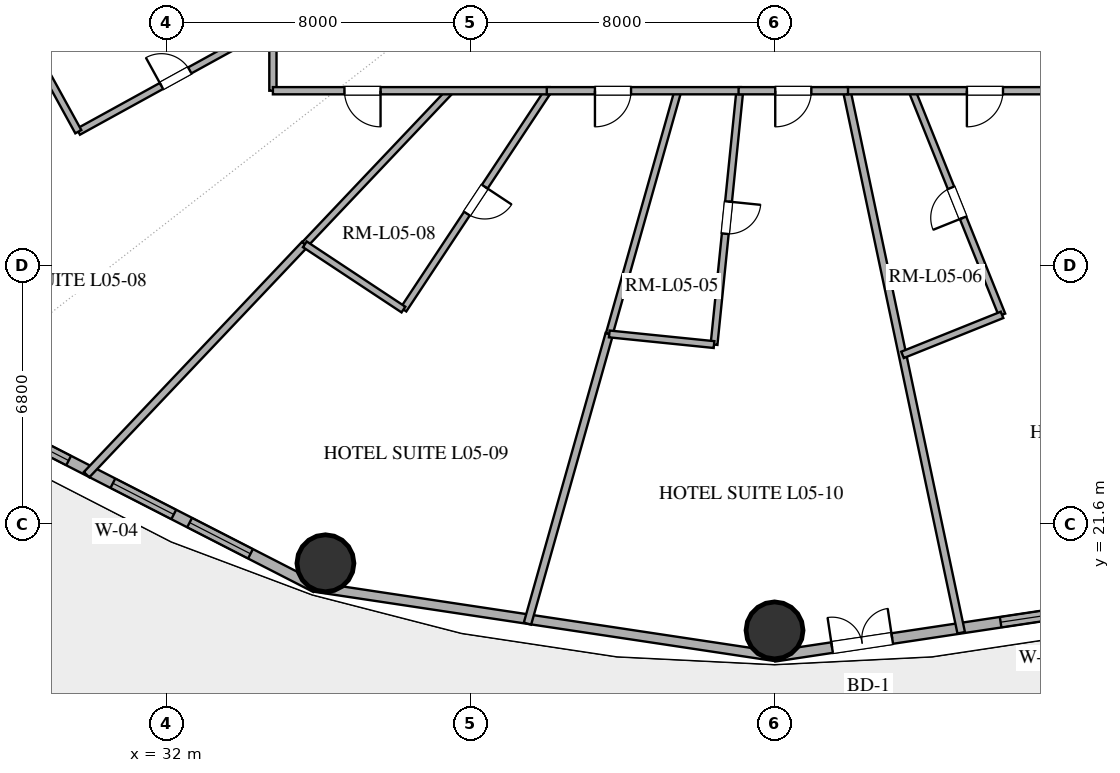
"""IFC4 building model, lengths in metres.
Left out: names, types, materials, properties, quantities, classifications, styles, units other than length and angle.
Written with IfcOpenShell. Run it as: python <this file> out.ifc"""

import sys

from ifc_helpers import new_model, si_unit, direction, frame, frame_2d, origin, origin_2d, place, context, subcontext, project, spatial, rectangle, hollow_circle, extrude, element, fill, save


model = new_model("IFC4")
c1 = context("Model", 3, precision=1e-05, world=origin(), true_north=direction((0.0, 1.0)))
c2 = subcontext(c1, "Body", "Model", "MODEL_VIEW")
j1 = project(units=[si_unit("LENGTHUNIT", "METRE"), si_unit("PLANEANGLEUNIT", "RADIAN")], contexts=[c1])
p1 = place(None, origin())
s1 = spatial("IfcSite", under=j1, at=p1, CompositionType="ELEMENT")
p2 = place(p1, origin())
s2 = spatial("IfcBuilding", under=s1, at=p2, CompositionType="ELEMENT")
p3 = place(p2, frame((0.0, 0.0, 28.2)))
s3 = spatial("IfcBuildingStorey", under=s2, at=p3, CompositionType="ELEMENT", Elevation=28.2)
for number, where, z_axis, x_axis in (
    (1, (36.182, 20.566, 0.0), (0.0, 0.0, 1.0), (1.0, 0.0, 0.0)),
    (2, (48.0, 18.8, 0.0), (0.0, 0.0, 1.0), (1.0, 0.0, 0.0)),
):
    element("IfcColumn", number, at=place(p3, frame(where, z_axis=z_axis, x_axis=x_axis)), inside=s3, PredefinedType="COLUMN", context=c2, shape_type="SweptSolid", body=[
        extrude(hollow_circle(Radius=0.75, WallThickness=0.04, at=origin_2d()), origin(), (0.0, 0.0, 1.0), 3.38),
    ])
p4 = place(p3, frame((25.826, 25.114, 0.0), z_axis=(0.0, 0.0, 1.0), x_axis=(0.889853976658, -0.456245438581, 0.0)))
e3 = element("IfcWall", 3, at=p4, inside=s3, PredefinedType="SOLIDWALL", context=c2, shape_type="SweptSolid", body=[
    extrude(rectangle(XDim=11.346, YDim=0.28, at=frame_2d((5.673, 0.0))), origin(), (0.0, 0.0, 1.0), 3.38),
])
p5 = place(p4, frame((1.945, 0.0, 0.85)))
e4 = element("IfcOpeningElement", 4, at=p5, cuts=e3, PredefinedType="OPENING", context=c2, shape_type="SweptSolid", body=[
    extrude(rectangle(XDim=2.1, YDim=2.2, at=frame_2d((1.05, 1.1))), frame((0.0, 0.15, 0.0), z_axis=(0.0, -1.0, 0.0), x_axis=(1.0, 0.0, 0.0)), (0.0, 0.0, 1.0), 0.3),
])
p6 = place(p4, frame((5.353, 0.0, 0.85)))
e5 = element("IfcOpeningElement", 5, at=p6, cuts=e3, PredefinedType="OPENING", context=c2, shape_type="SweptSolid", body=[
    extrude(rectangle(XDim=1.8, YDim=2.2, at=frame_2d((0.9, 1.1))), frame((0.0, 0.15, 0.0), z_axis=(0.0, -1.0, 0.0), x_axis=(1.0, 0.0, 0.0)), (0.0, 0.0, 1.0), 0.3),
])
p7 = place(p4, frame((7.622, 0.0, 0.85)))
e6 = element("IfcOpeningElement", 6, at=p7, cuts=e3, PredefinedType="OPENING", context=c2, shape_type="SweptSolid", body=[
    extrude(rectangle(XDim=1.8, YDim=2.2, at=frame_2d((0.9, 1.1))), frame((0.0, 0.15, 0.0), z_axis=(0.0, -1.0, 0.0), x_axis=(1.0, 0.0, 0.0)), (0.0, 0.0, 1.0), 0.3),
])
p8 = place(p3, frame((35.922, 19.938, 0.0), z_axis=(0.0, 0.0, 1.0), x_axis=(0.988864835849, -0.148816452121, 0.0)))
e7 = element("IfcWall", 7, at=p8, inside=s3, PredefinedType="SOLIDWALL", context=c2, shape_type="SweptSolid", body=[
    extrude(rectangle(XDim=12.214, YDim=0.25, at=frame_2d((6.107, 0.0))), origin(), (0.0, 0.0, 1.0), 3.38),
])
p9 = place(p3, frame((48.0, 18.12, 0.0), z_axis=(0.0, 0.0, 1.0), x_axis=(0.988864835849, 0.148816452121, 0.0)))
e8 = element("IfcWall", 8, at=p9, inside=s3, PredefinedType="SOLIDWALL", context=c2, shape_type="SweptSolid", body=[
    extrude(rectangle(XDim=12.214, YDim=0.28, at=frame_2d((6.107, 0.0))), origin(), (0.0, 0.0, 1.0), 3.38),
])
p10 = place(p9, frame((1.531, 0.0, 0.0)))
e9 = element("IfcOpeningElement", 9, at=p10, cuts=e8, PredefinedType="OPENING", context=c2, shape_type="SweptSolid", body=[
    extrude(rectangle(XDim=1.6, YDim=2.25, at=frame_2d((0.8, 1.125))), frame((0.0, 0.15, 0.0), z_axis=(0.0, -1.0, 0.0), x_axis=(1.0, 0.0, 0.0)), (0.0, 0.0, 1.0), 0.3),
])
p11 = place(p9, frame((6.016, 0.0, 0.85)))
e10 = element("IfcOpeningElement", 10, at=p11, cuts=e8, PredefinedType="OPENING", context=c2, shape_type="SweptSolid", body=[
    extrude(rectangle(XDim=1.5, YDim=2.0, at=frame_2d((0.75, 1.0))), frame((0.0, 0.15, 0.0), z_axis=(0.0, -1.0, 0.0), x_axis=(1.0, 0.0, 0.0)), (0.0, 0.0, 1.0), 0.3),
])
p12 = place(p9, frame((8.333, 0.0, 0.85)))
e11 = element("IfcOpeningElement", 11, at=p12, cuts=e8, PredefinedType="OPENING", context=c2, shape_type="SweptSolid", body=[
    extrude(rectangle(XDim=1.5, YDim=2.0, at=frame_2d((0.75, 1.0))), frame((0.0, 0.15, 0.0), z_axis=(0.0, -1.0, 0.0), x_axis=(1.0, 0.0, 0.0)), (0.0, 0.0, 1.0), 0.3),
])
p13 = place(p3, frame((34.8, 37.494, 0.0), z_axis=(0.0, 0.0, 1.0), x_axis=(-0.946390715793, -0.32302416792, 0.0)))
e12 = element("IfcWall", 12, at=p13, inside=s3, PredefinedType="PARTITIONING", context=c2, shape_type="SweptSolid", body=[
    extrude(rectangle(XDim=15.952, YDim=0.2, at=frame_2d((7.976, 0.0))), origin(), (0.0, 0.0, 1.0), 2.74),
])
p14 = place(p3, frame((29.897, 22.898, 0.0), z_axis=(0.0, 0.0, 1.0), x_axis=(0.687860615602, 0.725842802198, 0.0)))
e13 = element("IfcWall", 13, at=p14, inside=s3, PredefinedType="PARTITIONING", context=c2, shape_type="SweptSolid", body=[
    extrude(rectangle(XDim=8.35, YDim=0.2, at=frame_2d((4.175, 0.0))), origin(), (0.0, 0.0, 1.0), 2.74),
])
p15 = place(p3, frame((41.499, 18.978, 0.0), z_axis=(0.0, 0.0, 1.0), x_axis=(0.271768364569, 0.962362694632, 0.0)))
e14 = element("IfcWall", 14, at=p15, inside=s3, PredefinedType="PARTITIONING", context=c2, shape_type="SweptSolid", body=[
    extrude(rectangle(XDim=7.921, YDim=0.2, at=frame_2d((3.96, 0.0))), origin(), (0.0, 0.0, 1.0), 2.74),
])
p16 = place(p3, frame((49.9, 33.0, 0.0), z_axis=(0.0, 0.0, 1.0), x_axis=(0.206598790959, -0.97842574556, 0.0)))
e15 = element("IfcWall", 15, at=p16, inside=s3, PredefinedType="PARTITIONING", context=c2, shape_type="SweptSolid", body=[
    extrude(rectangle(XDim=14.576, YDim=0.2, at=frame_2d((7.288, 0.0))), origin(), (0.0, 0.0, 1.0), 2.74),
])
p17 = place(p3, frame((42.045, 33.0, 0.0), z_axis=(0.0, 0.0, 1.0), x_axis=(-0.551832909025, -0.833954699319, 0.0)))
e16 = element("IfcWall", 16, at=p17, inside=s3, PredefinedType="PLUMBINGWALL", context=c2, shape_type="SweptSolid", body=[
    extrude(rectangle(XDim=6.905, YDim=0.18, at=frame_2d((3.452, 0.0))), origin(), (0.0, 0.0, 1.0), 2.74),
])
p18 = place(p17, frame((3.027, 0.0, 0.0)))
e17 = element("IfcOpeningElement", 17, at=p18, cuts=e16, PredefinedType="OPENING", context=c2, shape_type="SweptSolid", body=[
    extrude(rectangle(XDim=0.85, YDim=2.1, at=frame_2d((0.425, 1.05))), frame((0.0, 0.1, 0.0), z_axis=(0.0, -1.0, 0.0), x_axis=(1.0, 0.0, 0.0)), (0.0, 0.0, 1.0), 0.2),
])
p19 = place(p3, frame((47.086, 33.0, 0.0), z_axis=(0.0, 0.0, 1.0), x_axis=(-0.101019373019, -0.994884458756, 0.0)))
e18 = element("IfcWall", 18, at=p19, inside=s3, PredefinedType="PLUMBINGWALL", context=c2, shape_type="SweptSolid", body=[
    extrude(rectangle(XDim=6.714, YDim=0.18, at=frame_2d((3.357, 0.0))), origin(), (0.0, 0.0, 1.0), 2.74),
])
p20 = place(p19, frame((2.932, 0.0, 0.0)))
e19 = element("IfcOpeningElement", 19, at=p20, cuts=e18, PredefinedType="OPENING", context=c2, shape_type="SweptSolid", body=[
    extrude(rectangle(XDim=0.85, YDim=2.1, at=frame_2d((0.425, 1.05))), frame((0.0, 0.1, 0.0), z_axis=(0.0, -1.0, 0.0), x_axis=(1.0, 0.0, 0.0)), (0.0, 0.0, 1.0), 0.2),
])
p21 = place(p3, frame((43.651, 26.601, 0.0), z_axis=(0.0, 0.0, 1.0), x_axis=(0.271761873698, 0.962364527611, 0.0)))
e20 = element("IfcWall", 20, at=p21, inside=s3, PredefinedType="PLUMBINGWALL", context=c2, shape_type="SweptSolid", body=[
    extrude(rectangle(XDim=6.65, YDim=0.18, at=frame_2d((3.325, 0.0))), origin(), (0.0, 0.0, 1.0), 2.74),
])
p22 = place(p3, frame((34.8, 33.0, 0.0), z_axis=(0.0, 0.0, 1.0), x_axis=(0.0, 1.0, 0.0)))
e21 = element("IfcWall", 21, at=p22, inside=s3, PredefinedType="PARTITIONING", context=c2, shape_type="SweptSolid", body=[
    extrude(rectangle(XDim=18.0, YDim=0.19, at=frame_2d((9.0, 0.0))), origin(), (0.0, 0.0, 1.0), 2.74),
])
p23 = place(p22, frame((7.274, 0.0, 0.0)))
e22 = element("IfcOpeningElement", 22, at=p23, cuts=e21, PredefinedType="OPENING", context=c2, shape_type="SweptSolid", body=[
    extrude(rectangle(XDim=1.0, YDim=2.2, at=frame_2d((0.5, 1.1))), frame((0.0, 0.105, 0.0), z_axis=(0.0, -1.0, 0.0), x_axis=(1.0, 0.0, 0.0)), (0.0, 0.0, 1.0), 0.21),
])
p24 = place(p22, frame((12.854, 0.0, 0.0)))
e23 = element("IfcOpeningElement", 23, at=p24, cuts=e21, PredefinedType="OPENING", context=c2, shape_type="SweptSolid", body=[
    extrude(rectangle(XDim=0.95, YDim=2.15, at=frame_2d((0.475, 1.075))), frame((0.0, 0.105, 0.0), z_axis=(0.0, -1.0, 0.0), x_axis=(1.0, 0.0, 0.0)), (0.0, 0.0, 1.0), 0.21),
])
p25 = place(p3, frame((53.987, 27.102, 0.0), z_axis=(0.0, 0.0, 1.0), x_axis=(-0.37285379951, 0.927890103509, 0.0)))
e24 = element("IfcWall", 24, at=p25, inside=s3, PredefinedType="PLUMBINGWALL", context=c2, shape_type="SweptSolid", body=[
    extrude(rectangle(XDim=6.356, YDim=0.18, at=frame_2d((3.178, 0.0))), origin(), (0.0, 0.0, 1.0), 2.74),
])
p26 = place(p25, frame((2.753, 0.0, 0.0)))
e25 = element("IfcOpeningElement", 25, at=p26, cuts=e24, PredefinedType="OPENING", context=c2, shape_type="SweptSolid", body=[
    extrude(rectangle(XDim=0.85, YDim=2.1, at=frame_2d((0.425, 1.05))), frame((0.0, 0.1, 0.0), z_axis=(0.0, -1.0, 0.0), x_axis=(1.0, 0.0, 0.0)), (0.0, 0.0, 1.0), 0.2),
])
p27 = place(p3, frame((29.679, 31.922, 0.0), z_axis=(0.0, 0.0, 1.0), x_axis=(0.876185038284, 0.481974873503, 0.0)))
e26 = element("IfcWall", 26, at=p27, inside=s3, PredefinedType="PLUMBINGWALL", context=c2, shape_type="SweptSolid", body=[
    extrude(rectangle(XDim=5.844, YDim=0.18, at=frame_2d((2.922, 0.0))), origin(), (0.0, 0.0, 1.0), 2.74),
])
p28 = place(p27, frame((2.497, 0.0, 0.0)))
e27 = element("IfcOpeningElement", 27, at=p28, cuts=e26, PredefinedType="OPENING", context=c2, shape_type="SweptSolid", body=[
    extrude(rectangle(XDim=0.85, YDim=2.1, at=frame_2d((0.425, 1.05))), frame((0.0, 0.1, 0.0), z_axis=(0.0, -1.0, 0.0), x_axis=(1.0, 0.0, 0.0)), (0.0, 0.0, 1.0), 0.2),
])
p29 = place(p3, frame((35.64, 28.958, 0.0), z_axis=(0.0, 0.0, 1.0), x_axis=(0.687867465085, 0.725836311077, 0.0)))
e28 = element("IfcWall", 28, at=p29, inside=s3, PredefinedType="PLUMBINGWALL", context=c2, shape_type="SweptSolid", body=[
    extrude(rectangle(XDim=5.568, YDim=0.18, at=frame_2d((2.784, 0.0))), origin(), (0.0, 0.0, 1.0), 2.74),
])
p30 = place(p3, frame((42.083, 33.0, 0.0), z_axis=(0.0, 0.0, 1.0), x_axis=(-1.0, 0.0, 0.0)))
e29 = element("IfcWall", 29, at=p30, inside=s3, PredefinedType="PARTITIONING", context=c2, shape_type="SweptSolid", body=[
    extrude(rectangle(XDim=7.283, YDim=0.19, at=frame_2d((3.642, 0.0))), origin(), (0.0, 0.0, 1.0), 2.74),
])
p31 = place(p30, frame((4.451, 0.0, 0.0)))
e30 = element("IfcOpeningElement", 30, at=p31, cuts=e29, PredefinedType="OPENING", context=c2, shape_type="SweptSolid", body=[
    extrude(rectangle(XDim=0.95, YDim=2.15, at=frame_2d((0.475, 1.075))), frame((0.0, 0.105, 0.0), z_axis=(0.0, -1.0, 0.0), x_axis=(1.0, 0.0, 0.0)), (0.0, 0.0, 1.0), 0.21),
])
p32 = place(p3, frame((61.2, 33.0, 0.0), z_axis=(0.0, 0.0, 1.0), x_axis=(-1.0, 0.0, 0.0)))
e31 = element("IfcWall", 31, at=p32, inside=s3, PredefinedType="PARTITIONING", context=c2, shape_type="SweptSolid", body=[
    extrude(rectangle(XDim=11.3, YDim=0.19, at=frame_2d((5.65, 0.0))), origin(), (0.0, 0.0, 1.0), 2.74),
])
p33 = place(p32, frame((7.188, 0.0, 0.0)))
e32 = element("IfcOpeningElement", 32, at=p33, cuts=e31, PredefinedType="OPENING", context=c2, shape_type="SweptSolid", body=[
    extrude(rectangle(XDim=0.95, YDim=2.15, at=frame_2d((0.475, 1.075))), frame((0.0, 0.105, 0.0), z_axis=(0.0, -1.0, 0.0), x_axis=(1.0, 0.0, 0.0)), (0.0, 0.0, 1.0), 0.21),
])
p34 = place(p3, frame((27.908, 35.142, 0.0), z_axis=(0.0, 0.0, 1.0), x_axis=(0.481967195945, -0.876189261537, 0.0)))
e33 = element("IfcWall", 33, at=p34, inside=s3, PredefinedType="PLUMBINGWALL", context=c2, shape_type="SweptSolid", body=[
    extrude(rectangle(XDim=3.676, YDim=0.18, at=frame_2d((1.838, 0.0))), origin(), (0.0, 0.0, 1.0), 2.74),
])
p35 = place(p3, frame((47.118, 33.0, 0.0), z_axis=(0.0, 0.0, 1.0), x_axis=(-1.0, 0.0, 0.0)))
e34 = element("IfcWall", 34, at=p35, inside=s3, PredefinedType="PARTITIONING", context=c2, shape_type="SweptSolid", body=[
    extrude(rectangle(XDim=5.112, YDim=0.19, at=frame_2d((2.556, 0.0))), origin(), (0.0, 0.0, 1.0), 2.74),
])
p36 = place(p35, frame((2.894, 0.0, 0.0)))
e35 = element("IfcOpeningElement", 35, at=p36, cuts=e34, PredefinedType="OPENING", context=c2, shape_type="SweptSolid", body=[
    extrude(rectangle(XDim=0.95, YDim=2.15, at=frame_2d((0.475, 1.075))), frame((0.0, 0.105, 0.0), z_axis=(0.0, -1.0, 0.0), x_axis=(1.0, 0.0, 0.0)), (0.0, 0.0, 1.0), 0.21),
])
p37 = place(p3, frame((38.235, 27.242, 0.0), z_axis=(0.0, 0.0, 1.0), x_axis=(-0.833965136837, 0.551817135055, 0.0)))
e36 = element("IfcWall", 36, at=p37, inside=s3, PredefinedType="PLUMBINGWALL", context=c2, shape_type="SweptSolid", body=[
    extrude(rectangle(XDim=3.111, YDim=0.18, at=frame_2d((1.555, 0.0))), origin(), (0.0, 0.0, 1.0), 2.74),
])
p38 = place(p3, frame((49.933, 33.0, 0.0), z_axis=(0.0, 0.0, 1.0), x_axis=(-1.0, 0.0, 0.0)))
e37 = element("IfcWall", 37, at=p38, inside=s3, PredefinedType="PARTITIONING", context=c2, shape_type="SweptSolid", body=[
    extrude(rectangle(XDim=2.879, YDim=0.19, at=frame_2d((1.44, 0.0))), origin(), (0.0, 0.0, 1.0), 2.74),
])
p39 = place(p38, frame((0.965, 0.0, 0.0)))
e38 = element("IfcOpeningElement", 38, at=p39, cuts=e37, PredefinedType="OPENING", context=c2, shape_type="SweptSolid", body=[
    extrude(rectangle(XDim=0.95, YDim=2.15, at=frame_2d((0.475, 1.075))), frame((0.0, 0.105, 0.0), z_axis=(0.0, -1.0, 0.0), x_axis=(1.0, 0.0, 0.0)), (0.0, 0.0, 1.0), 0.21),
])
p40 = place(p3, frame((51.368, 26.05, 0.0), z_axis=(0.0, 0.0, 1.0), x_axis=(0.927890861741, 0.372851912558, 0.0)))
e39 = element("IfcWall", 39, at=p40, inside=s3, PredefinedType="PLUMBINGWALL", context=c2, shape_type="SweptSolid", body=[
    extrude(rectangle(XDim=2.822, YDim=0.18, at=frame_2d((1.411, 0.0))), origin(), (0.0, 0.0, 1.0), 2.74),
])
p41 = place(p3, frame((46.407, 26.321, 0.0), z_axis=(0.0, 0.0, 1.0), x_axis=(-0.994878004338, 0.101082918857, 0.0)))
e40 = element("IfcWall", 40, at=p41, inside=s3, PredefinedType="PLUMBINGWALL", context=c2, shape_type="SweptSolid", body=[
    extrude(rectangle(XDim=2.77, YDim=0.18, at=frame_2d((1.385, 0.0))), origin(), (0.0, 0.0, 1.0), 2.74),
])
p42 = place(p5, origin())
e41 = element("IfcWindow", 41, at=p42, inside=s3, PartitioningType="SINGLE_PANEL", PredefinedType="WINDOW", context=c2, shape_type="SweptSolid", body=[
    extrude(rectangle(XDim=2.1, YDim=2.2, at=frame_2d((1.05, 1.1))), frame((0.0, 0.03, 0.0), z_axis=(0.0, -1.0, 0.0), x_axis=(1.0, 0.0, 0.0)), (0.0, 0.0, 1.0), 0.06),
])
fill(e4, e41)
p43 = place(p6, origin())
e42 = element("IfcWindow", 42, at=p43, inside=s3, PartitioningType="SINGLE_PANEL", PredefinedType="WINDOW", context=c2, shape_type="SweptSolid", body=[
    extrude(rectangle(XDim=1.8, YDim=2.2, at=frame_2d((0.9, 1.1))), frame((0.0, 0.03, 0.0), z_axis=(0.0, -1.0, 0.0), x_axis=(1.0, 0.0, 0.0)), (0.0, 0.0, 1.0), 0.06),
])
fill(e5, e42)
p44 = place(p7, origin())
e43 = element("IfcWindow", 43, at=p44, inside=s3, PartitioningType="SINGLE_PANEL", PredefinedType="WINDOW", context=c2, shape_type="SweptSolid", body=[
    extrude(rectangle(XDim=1.8, YDim=2.2, at=frame_2d((0.9, 1.1))), frame((0.0, 0.03, 0.0), z_axis=(0.0, -1.0, 0.0), x_axis=(1.0, 0.0, 0.0)), (0.0, 0.0, 1.0), 0.06),
])
fill(e6, e43)
p45 = place(p10, origin())
e44 = element("IfcDoor", 44, at=p45, inside=s3, OperationType="DOUBLE_DOOR_SINGLE_SWING", PredefinedType="DOOR", context=c2, shape_type="SweptSolid", body=[
    extrude(rectangle(XDim=1.6, YDim=2.25, at=frame_2d((0.8, 1.125))), frame((0.0, 0.025, 0.0), z_axis=(0.0, -1.0, 0.0), x_axis=(1.0, 0.0, 0.0)), (0.0, 0.0, 1.0), 0.05),
])
fill(e9, e44)
p46 = place(p11, origin())
e45 = element("IfcWindow", 45, at=p46, inside=s3, PartitioningType="SINGLE_PANEL", PredefinedType="WINDOW", context=c2, shape_type="SweptSolid", body=[
    extrude(rectangle(XDim=1.5, YDim=2.0, at=frame_2d((0.75, 1.0))), frame((0.0, 0.03, 0.0), z_axis=(0.0, -1.0, 0.0), x_axis=(1.0, 0.0, 0.0)), (0.0, 0.0, 1.0), 0.06),
])
fill(e10, e45)
p47 = place(p18, origin())
e46 = element("IfcDoor", 46, at=p47, inside=s3, OperationType="SINGLE_SWING_LEFT", PredefinedType="DOOR", context=c2, shape_type="SweptSolid", body=[
    extrude(rectangle(XDim=0.85, YDim=2.1, at=frame_2d((0.425, 1.05))), frame((0.0, 0.025, 0.0), z_axis=(0.0, -1.0, 0.0), x_axis=(1.0, 0.0, 0.0)), (0.0, 0.0, 1.0), 0.05),
])
fill(e17, e46)
p48 = place(p20, origin())
e47 = element("IfcDoor", 47, at=p48, inside=s3, OperationType="SINGLE_SWING_LEFT", PredefinedType="DOOR", context=c2, shape_type="SweptSolid", body=[
    extrude(rectangle(XDim=0.85, YDim=2.1, at=frame_2d((0.425, 1.05))), frame((0.0, 0.025, 0.0), z_axis=(0.0, -1.0, 0.0), x_axis=(1.0, 0.0, 0.0)), (0.0, 0.0, 1.0), 0.05),
])
fill(e19, e47)
p49 = place(p26, origin())
e48 = element("IfcDoor", 48, at=p49, inside=s3, OperationType="SINGLE_SWING_LEFT", PredefinedType="DOOR", context=c2, shape_type="SweptSolid", body=[
    extrude(rectangle(XDim=0.85, YDim=2.1, at=frame_2d((0.425, 1.05))), frame((0.0, 0.025, 0.0), z_axis=(0.0, -1.0, 0.0), x_axis=(1.0, 0.0, 0.0)), (0.0, 0.0, 1.0), 0.05),
])
fill(e25, e48)
p50 = place(p28, origin())
e49 = element("IfcDoor", 49, at=p50, inside=s3, OperationType="SINGLE_SWING_LEFT", PredefinedType="DOOR", context=c2, shape_type="SweptSolid", body=[
    extrude(rectangle(XDim=0.85, YDim=2.1, at=frame_2d((0.425, 1.05))), frame((0.0, 0.025, 0.0), z_axis=(0.0, -1.0, 0.0), x_axis=(1.0, 0.0, 0.0)), (0.0, 0.0, 1.0), 0.05),
])
fill(e27, e49)
p51 = place(p31, origin())
e50 = element("IfcDoor", 50, at=p51, inside=s3, OperationType="SINGLE_SWING_LEFT", PredefinedType="DOOR", context=c2, shape_type="SweptSolid", body=[
    extrude(rectangle(XDim=0.95, YDim=2.15, at=frame_2d((0.475, 1.075))), frame((0.0, 0.025, 0.0), z_axis=(0.0, -1.0, 0.0), x_axis=(1.0, 0.0, 0.0)), (0.0, 0.0, 1.0), 0.05),
])
fill(e30, e50)
p52 = place(p33, origin())
e51 = element("IfcDoor", 51, at=p52, inside=s3, OperationType="SINGLE_SWING_RIGHT", PredefinedType="DOOR", context=c2, shape_type="SweptSolid", body=[
    extrude(rectangle(XDim=0.95, YDim=2.15, at=frame_2d((0.475, 1.075))), frame((0.0, 0.025, 0.0), z_axis=(0.0, -1.0, 0.0), x_axis=(1.0, 0.0, 0.0)), (0.0, 0.0, 1.0), 0.05),
])
fill(e32, e51)
p53 = place(p36, origin())
e52 = element("IfcDoor", 52, at=p53, inside=s3, OperationType="SINGLE_SWING_RIGHT", PredefinedType="DOOR", context=c2, shape_type="SweptSolid", body=[
    extrude(rectangle(XDim=0.95, YDim=2.15, at=frame_2d((0.475, 1.075))), frame((0.0, 0.025, 0.0), z_axis=(0.0, -1.0, 0.0), x_axis=(1.0, 0.0, 0.0)), (0.0, 0.0, 1.0), 0.05),
])
fill(e35, e52)
p54 = place(p39, origin())
e53 = element("IfcDoor", 53, at=p54, inside=s3, OperationType="SINGLE_SWING_RIGHT", PredefinedType="DOOR", context=c2, shape_type="SweptSolid", body=[
    extrude(rectangle(XDim=0.95, YDim=2.15, at=frame_2d((0.475, 1.075))), frame((0.0, 0.025, 0.0), z_axis=(0.0, -1.0, 0.0), x_axis=(1.0, 0.0, 0.0)), (0.0, 0.0, 1.0), 0.05),
])
fill(e38, e53)
save(model, sys.argv[1])
